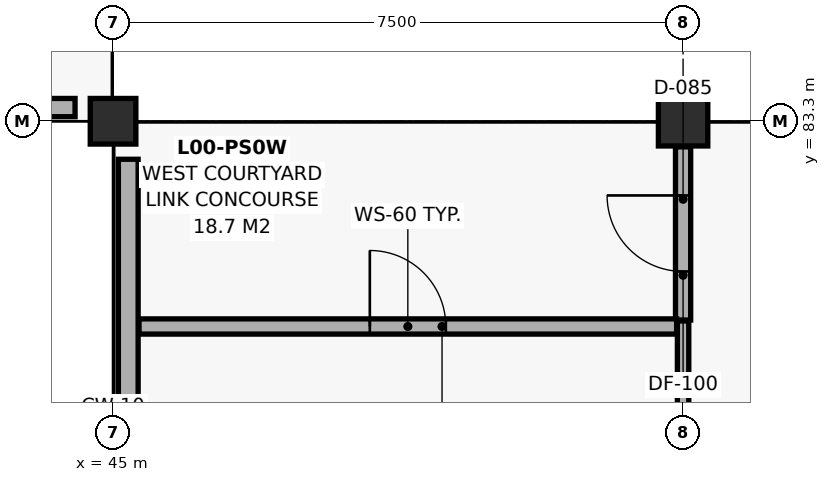
"""IFC4 building model, lengths in metres.
Left out: names, types, materials, properties, quantities, classifications, styles, units other than length and angle.
Written with IfcOpenShell. Run it as: python <this file> out.ifc"""

import sys

from ifc_helpers import new_model, si_unit, direction, frame, frame_2d, origin, origin_2d, place, context, subcontext, project, spatial, rectangle, extrude, element, fill, save


model = new_model("IFC4")
c1 = context("Model", 3, precision=1e-05, world=origin(), true_north=direction((0.0, 1.0)))
c2 = subcontext(c1, "Body", "Model", "MODEL_VIEW")
j1 = project(units=[si_unit("LENGTHUNIT", "METRE"), si_unit("PLANEANGLEUNIT", "RADIAN")], contexts=[c1])
p1 = place(None, origin())
s1 = spatial("IfcSite", under=j1, at=p1, CompositionType="ELEMENT")
p2 = place(p1, origin())
s2 = spatial("IfcBuilding", under=s1, at=p2, CompositionType="ELEMENT")
p3 = place(p2, origin())
s3 = spatial("IfcBuildingStorey", under=s2, at=p3, CompositionType="ELEMENT", Elevation=0.0)
p4 = place(p3, frame((45.0, 83.3, 0.0), z_axis=(0.0, 0.0, 1.0), x_axis=(1.0, 0.0, 0.0)))
e1 = element("IfcColumn", 1, at=p4, inside=s3, PredefinedType="COLUMN", context=c2, shape_type="SweptSolid", body=[
    extrude(rectangle(XDim=0.6, YDim=0.6, at=origin_2d()), origin(), (0.0, 0.0, 1.0), 4.7),
])
p5 = place(p3, frame((52.5, 83.3, 0.0), z_axis=(0.0, 0.0, 1.0), x_axis=(1.0, 0.0, 0.0)))
e2 = element("IfcColumn", 2, at=p5, inside=s3, PredefinedType="COLUMN", context=c2, shape_type="SweptSolid", body=[
    extrude(rectangle(XDim=0.65, YDim=0.65, at=origin_2d()), origin(), (0.0, 0.0, 1.0), 4.7),
])
p6 = place(p3, frame((44.5, 83.48, 4.9), z_axis=(0.0, 0.0, 1.0), x_axis=(-1.0, 0.0, 0.0)))
e3 = element("IfcWall", 3, at=p6, inside=s3, PredefinedType="PARAPET", context=c2, shape_type="SweptSolid", body=[
    extrude(rectangle(XDim=6.52, YDim=0.24, at=frame_2d((3.26, 0.0))), origin(), (0.0, 0.0, 1.0), 0.6),
])
p7 = place(p3, frame((45.2, 76.28, 4.9), z_axis=(0.0, 0.0, 1.0), x_axis=(0.0, 1.0, 0.0)))
e4 = element("IfcWall", 4, at=p7, inside=s3, PredefinedType="PARAPET", context=c2, shape_type="SweptSolid", body=[
    extrude(rectangle(XDim=6.52, YDim=0.26, at=frame_2d((3.26, 0.0))), origin(), (0.0, 0.0, 1.0), 0.6),
])
p8 = place(p3, frame((52.5, 80.685, 0.0), z_axis=(0.0, 0.0, 1.0), x_axis=(0.0, 1.0, 0.0)))
e5 = element("IfcWall", 5, at=p8, inside=s3, PredefinedType="PARTITIONING", context=c2, shape_type="SweptSolid", body=[
    extrude(rectangle(XDim=2.278, YDim=0.2, at=frame_2d((1.139, 0.0))), origin(), (0.0, 0.0, 1.0), 4.7),
])
p9 = place(p8, frame((0.639, 0.0, 0.0)))
e6 = element("IfcOpeningElement", 6, at=p9, cuts=e5, PredefinedType="OPENING", context=c2, shape_type="SweptSolid", body=[
    extrude(rectangle(XDim=1.0, YDim=2.15, at=frame_2d((0.5, 1.075))), frame((0.0, 0.112, 0.0), z_axis=(0.0, -1.0, 0.0), x_axis=(1.0, 0.0, 0.0)), (0.0, 0.0, 1.0), 0.224),
])
p10 = place(p3, frame((45.342, 80.6, 0.0), z_axis=(0.0, 0.0, 1.0), x_axis=(1.0, 0.0, 0.0)))
e7 = element("IfcWall", 7, at=p10, inside=s3, PredefinedType="PARTITIONING", context=c2, shape_type="SweptSolid", body=[
    extrude(rectangle(XDim=7.073, YDim=0.2, at=frame_2d((3.537, 0.0))), origin(), (0.0, 0.0, 1.0), 4.7),
])
p11 = place(p10, frame((3.037, 0.0, 0.0)))
e8 = element("IfcOpeningElement", 8, at=p11, cuts=e7, PredefinedType="OPENING", context=c2, shape_type="SweptSolid", body=[
    extrude(rectangle(XDim=1.0, YDim=2.15, at=frame_2d((0.5, 1.075))), frame((0.0, 0.112, 0.0), z_axis=(0.0, -1.0, 0.0), x_axis=(1.0, 0.0, 0.0)), (0.0, 0.0, 1.0), 0.224),
])
p12 = place(p3, frame((52.5, 76.062, 0.0), z_axis=(0.0, 0.0, 1.0), x_axis=(0.0, 1.0, 0.0)))
e9 = element("IfcWall", 9, at=p12, inside=s3, PredefinedType="PARTITIONING", context=c2, shape_type="SweptSolid", body=[
    extrude(rectangle(XDim=4.611, YDim=0.15, at=frame_2d((2.306, 0.0))), origin(), (0.0, 0.0, 1.0), 4.7),
])
p13 = place(p9, origin())
e10 = element("IfcDoor", 10, at=p13, inside=s3, OperationType="SINGLE_SWING_RIGHT", PredefinedType="DOOR", context=c2, shape_type="SweptSolid", body=[
    extrude(rectangle(XDim=1.0, YDim=2.15, at=frame_2d((0.5, 1.075))), frame((0.0, 0.025, 0.0), z_axis=(0.0, -1.0, 0.0), x_axis=(1.0, 0.0, 0.0)), (0.0, 0.0, 1.0), 0.05),
])
fill(e6, e10)
p14 = place(p11, origin())
e11 = element("IfcDoor", 11, at=p14, inside=s3, OperationType="SINGLE_SWING_LEFT", PredefinedType="DOOR", context=c2, shape_type="SweptSolid", body=[
    extrude(rectangle(XDim=1.0, YDim=2.15, at=frame_2d((0.5, 1.075))), frame((0.0, 0.025, 0.0), z_axis=(0.0, -1.0, 0.0), x_axis=(1.0, 0.0, 0.0)), (0.0, 0.0, 1.0), 0.05),
])
fill(e8, e11)
save(model, sys.argv[1])
